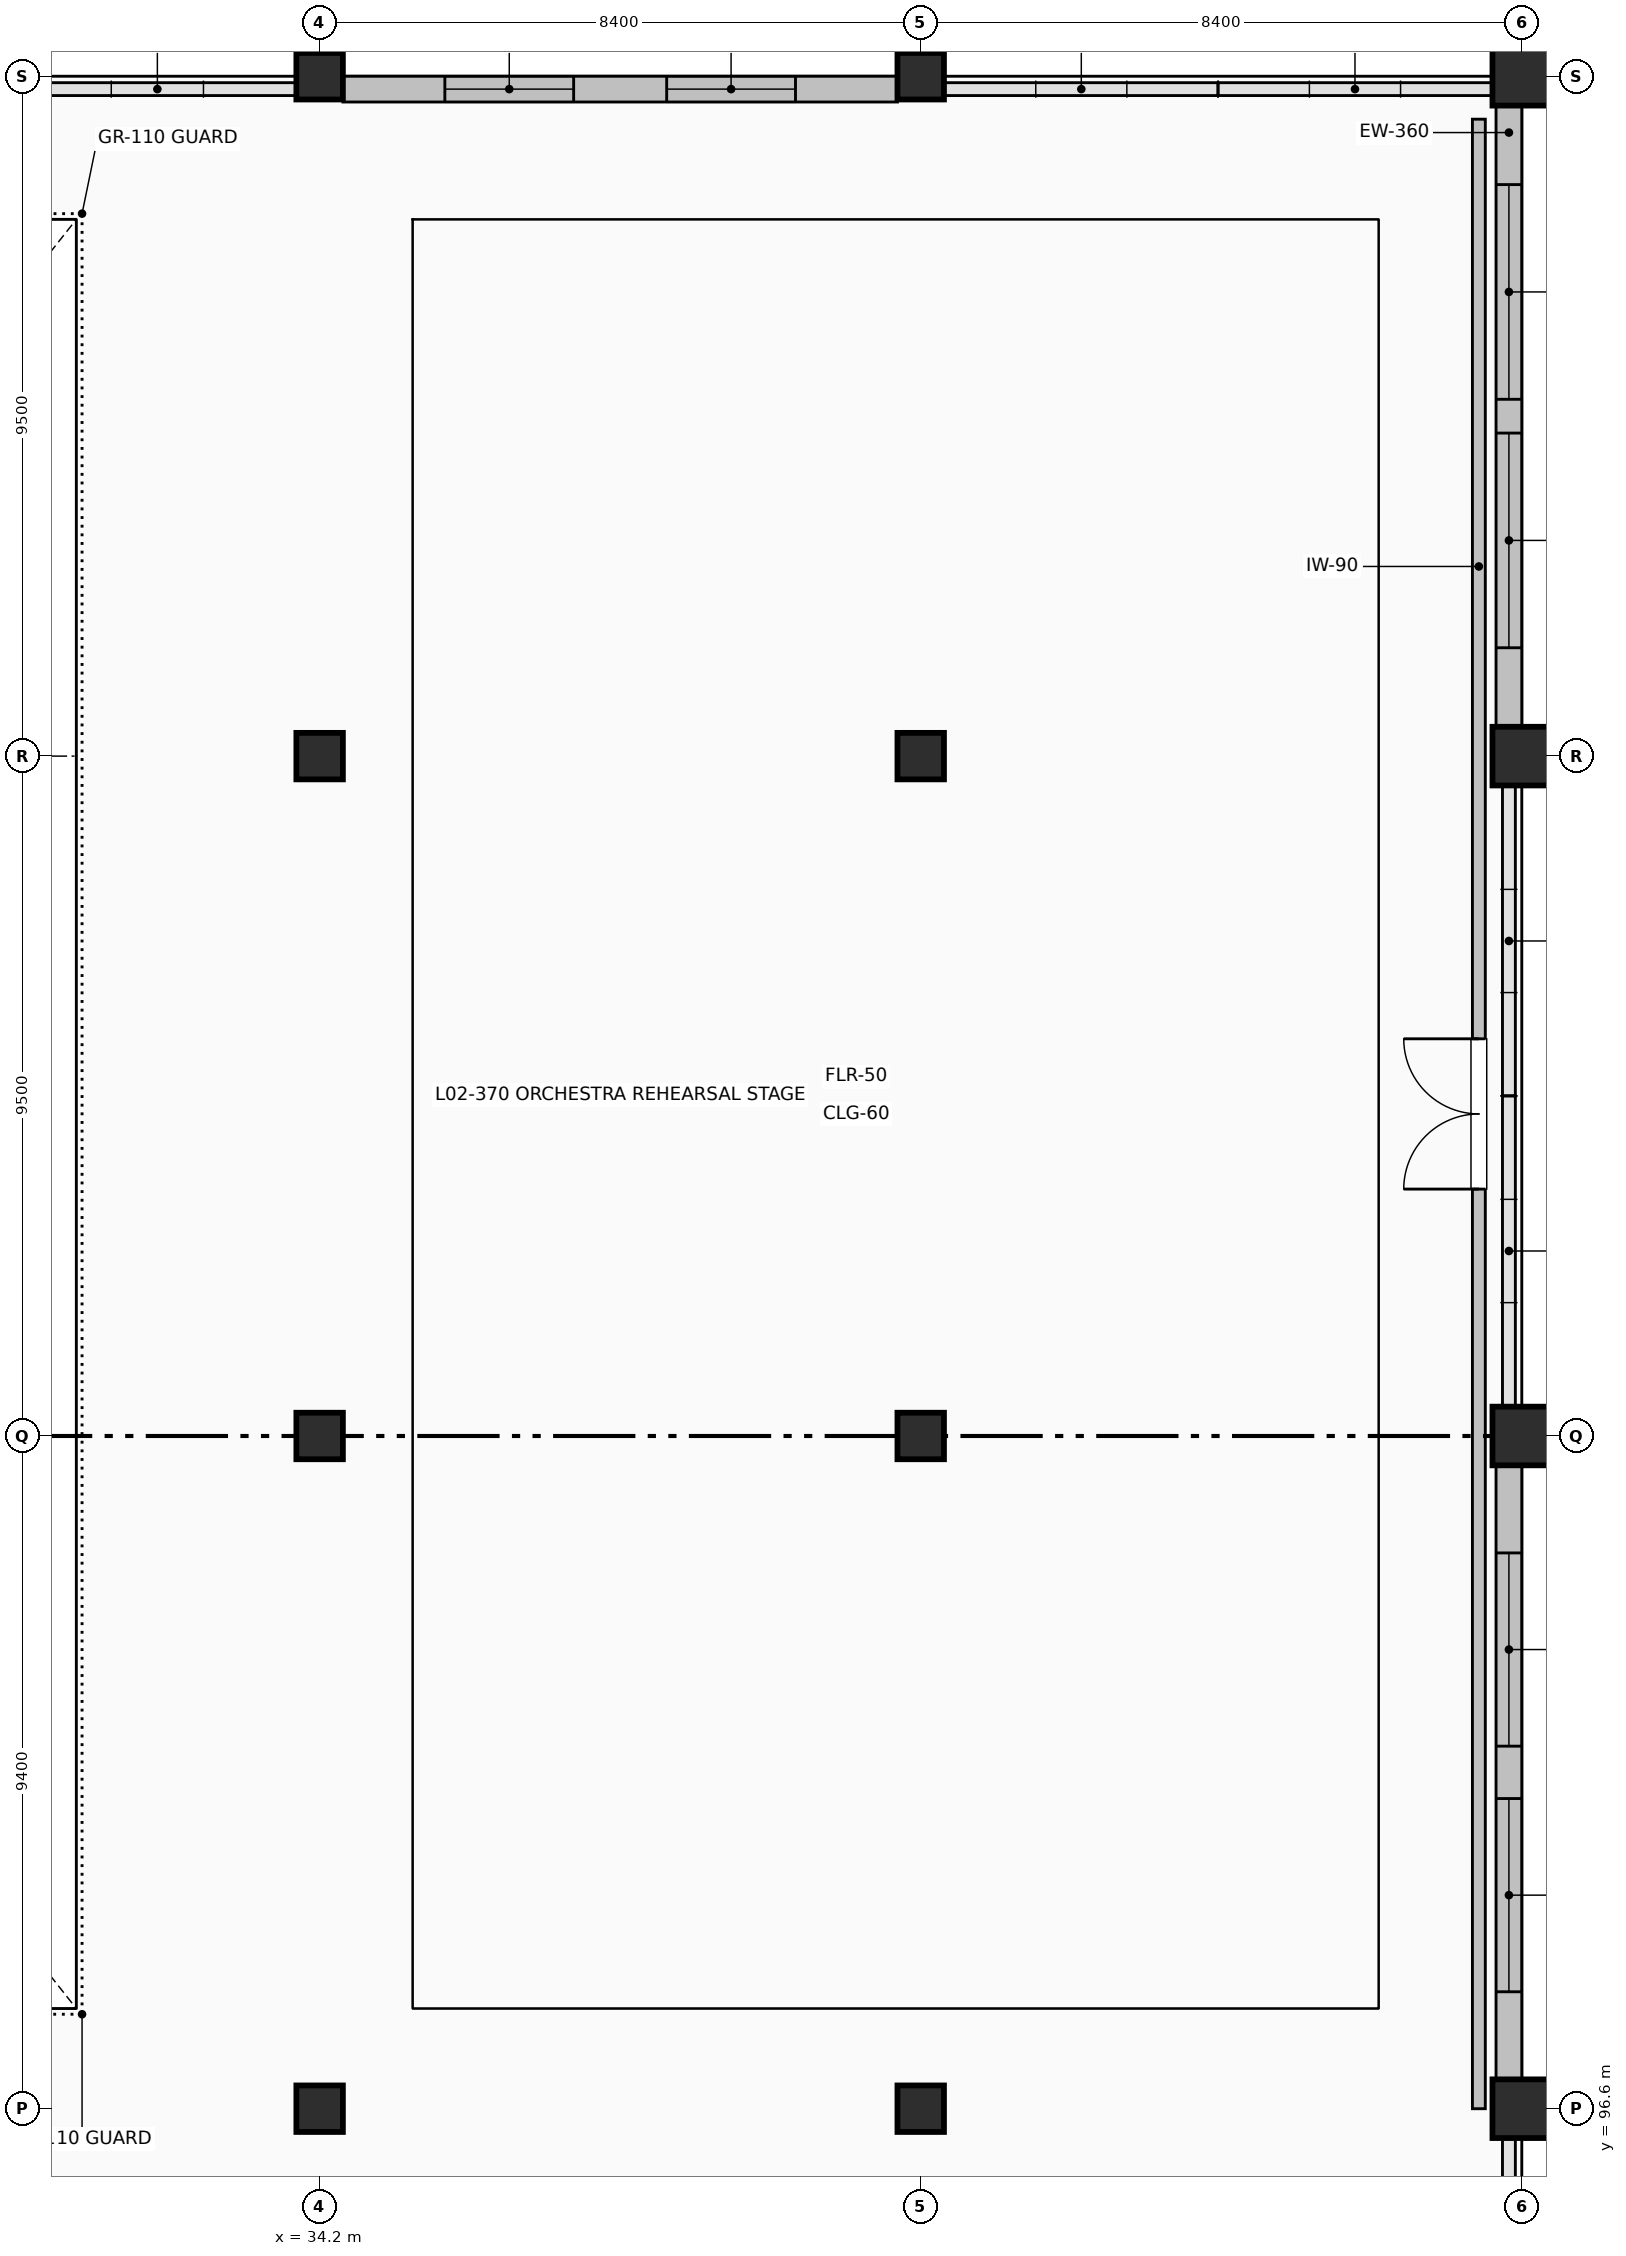
"""IFC4 building model, lengths in metres.
Left out: names, types, materials, properties, quantities, classifications, styles, units other than length and angle.
Written with IfcOpenShell. Run it as: python <this file> out.ifc"""

import sys

from ifc_helpers import new_model, si_unit, direction, frame, frame_2d, origin, origin_2d, place, context, subcontext, project, spatial, rectangle, extrude, element, fill, save


model = new_model("IFC4")
c1 = context("Model", 3, precision=1e-05, world=origin(), true_north=direction((0.0, 1.0)))
c2 = subcontext(c1, "Body", "Model", "MODEL_VIEW")
j1 = project(units=[si_unit("LENGTHUNIT", "METRE"), si_unit("PLANEANGLEUNIT", "RADIAN")], contexts=[c1])
p1 = place(None, origin())
s1 = spatial("IfcSite", under=j1, at=p1, CompositionType="ELEMENT")
p2 = place(p1, origin())
s2 = spatial("IfcBuilding", under=s1, at=p2, CompositionType="ELEMENT")
p3 = place(p2, frame((0.0, 0.0, 10.2)))
s3 = spatial("IfcBuildingStorey", under=s2, at=p3, CompositionType="ELEMENT", Elevation=10.2)
for number, where, z_axis, x_axis in (
    (1, (34.2, 96.6, 0.0), (0.0, 0.0, 1.0), (1.0, 0.0, 0.0)),
    (2, (34.2, 106.0, 0.0), (0.0, 0.0, 1.0), (1.0, 0.0, 0.0)),
    (3, (34.2, 115.5, 0.0), (0.0, 0.0, 1.0), (1.0, 0.0, 0.0)),
    (4, (34.2, 125.0, 0.0), (0.0, 0.0, 1.0), (1.0, 0.0, 0.0)),
    (5, (42.6, 96.6, 0.0), (0.0, 0.0, 1.0), (1.0, 0.0, 0.0)),
    (6, (42.6, 106.0, 0.0), (0.0, 0.0, 1.0), (1.0, 0.0, 0.0)),
    (7, (42.6, 115.5, 0.0), (0.0, 0.0, 1.0), (1.0, 0.0, 0.0)),
    (8, (42.6, 125.0, 0.0), (0.0, 0.0, 1.0), (1.0, 0.0, 0.0)),
):
    element("IfcColumn", number, at=place(p3, frame(where, z_axis=z_axis, x_axis=x_axis)), inside=s3, PredefinedType="COLUMN", context=c2, shape_type="SweptSolid", body=[
        extrude(rectangle(XDim=0.65, YDim=0.65, at=origin_2d()), origin(), (0.0, 0.0, 1.0), 4.8),
    ])
for number, where, z_axis, x_axis in (
    (9, (51.0, 96.6, 0.0), (0.0, 0.0, 1.0), (1.0, 0.0, 0.0)),
    (10, (51.0, 106.0, 0.0), (0.0, 0.0, 1.0), (1.0, 0.0, 0.0)),
    (11, (51.0, 115.5, 0.0), (0.0, 0.0, 1.0), (1.0, 0.0, 0.0)),
    (12, (51.0, 125.0, 0.0), (0.0, 0.0, 1.0), (1.0, 0.0, 0.0)),
):
    element("IfcColumn", number, at=place(p3, frame(where, z_axis=z_axis, x_axis=x_axis)), inside=s3, PredefinedType="COLUMN", context=c2, shape_type="SweptSolid", body=[
        extrude(rectangle(XDim=0.82, YDim=0.82, at=origin_2d()), origin(), (0.0, 0.0, 1.0), 4.8),
    ])
p4 = place(p3, frame((50.82, 124.59, 0.0), z_axis=(0.0, 0.0, 1.0), x_axis=(0.0, -1.0, 0.0)))
e13 = element("IfcWall", 13, at=p4, inside=s3, PredefinedType="SOLIDWALL", context=c2, shape_type="SweptSolid", body=[
    extrude(rectangle(XDim=8.68, YDim=0.36, at=frame_2d((4.34, 0.0))), origin(), (0.0, 0.0, 1.0), 3.592),
])
p5 = place(p4, frame((1.104, 0.0, 0.9)))
e14 = element("IfcOpeningElement", 14, at=p5, cuts=e13, PredefinedType="OPENING", context=c2, shape_type="SweptSolid", body=[
    extrude(rectangle(XDim=3.0, YDim=2.1, at=frame_2d((1.5, 1.05))), frame((0.0, 0.19, 0.0), z_axis=(0.0, -1.0, 0.0), x_axis=(1.0, 0.0, 0.0)), (0.0, 0.0, 1.0), 0.38),
])
p6 = place(p4, frame((4.576, 0.0, 0.9)))
e15 = element("IfcOpeningElement", 15, at=p6, cuts=e13, PredefinedType="OPENING", context=c2, shape_type="SweptSolid", body=[
    extrude(rectangle(XDim=3.0, YDim=2.1, at=frame_2d((1.5, 1.05))), frame((0.0, 0.19, 0.0), z_axis=(0.0, -1.0, 0.0), x_axis=(1.0, 0.0, 0.0)), (0.0, 0.0, 1.0), 0.38),
])
p7 = place(p3, frame((50.82, 105.59, 0.0), z_axis=(0.0, 0.0, 1.0), x_axis=(0.0, -1.0, 0.0)))
e16 = element("IfcWall", 16, at=p7, inside=s3, PredefinedType="SOLIDWALL", context=c2, shape_type="SweptSolid", body=[
    extrude(rectangle(XDim=8.58, YDim=0.36, at=frame_2d((4.29, 0.0))), origin(), (0.0, 0.0, 1.0), 3.592),
])
p8 = place(p7, frame((1.224, 0.0, 0.9)))
e17 = element("IfcOpeningElement", 17, at=p8, cuts=e16, PredefinedType="OPENING", context=c2, shape_type="SweptSolid", body=[
    extrude(rectangle(XDim=2.7, YDim=2.1, at=frame_2d((1.35, 1.05))), frame((0.0, 0.19, 0.0), z_axis=(0.0, -1.0, 0.0), x_axis=(1.0, 0.0, 0.0)), (0.0, 0.0, 1.0), 0.38),
])
p9 = place(p7, frame((4.656, 0.0, 0.9)))
e18 = element("IfcOpeningElement", 18, at=p9, cuts=e16, PredefinedType="OPENING", context=c2, shape_type="SweptSolid", body=[
    extrude(rectangle(XDim=2.7, YDim=2.1, at=frame_2d((1.35, 1.05))), frame((0.0, 0.19, 0.0), z_axis=(0.0, -1.0, 0.0), x_axis=(1.0, 0.0, 0.0)), (0.0, 0.0, 1.0), 0.38),
])
p10 = place(p3, frame((34.525, 124.82, 0.0), z_axis=(0.0, 0.0, 1.0), x_axis=(1.0, 0.0, 0.0)))
e19 = element("IfcWall", 19, at=p10, inside=s3, PredefinedType="SOLIDWALL", context=c2, shape_type="SweptSolid", body=[
    extrude(rectangle(XDim=7.75, YDim=0.36, at=frame_2d((3.875, 0.0))), origin(), (0.0, 0.0, 1.0), 3.592),
])
p11 = place(p10, frame((1.425, 0.0, 0.9)))
e20 = element("IfcOpeningElement", 20, at=p11, cuts=e19, PredefinedType="OPENING", context=c2, shape_type="SweptSolid", body=[
    extrude(rectangle(XDim=1.8, YDim=2.1, at=frame_2d((0.9, 1.05))), frame((0.0, 0.19, 0.0), z_axis=(0.0, -1.0, 0.0), x_axis=(1.0, 0.0, 0.0)), (0.0, 0.0, 1.0), 0.38),
])
p12 = place(p10, frame((4.525, 0.0, 0.9)))
e21 = element("IfcOpeningElement", 21, at=p12, cuts=e19, PredefinedType="OPENING", context=c2, shape_type="SweptSolid", body=[
    extrude(rectangle(XDim=1.8, YDim=2.1, at=frame_2d((0.9, 1.05))), frame((0.0, 0.19, 0.0), z_axis=(0.0, -1.0, 0.0), x_axis=(1.0, 0.0, 0.0)), (0.0, 0.0, 1.0), 0.38),
])
p13 = place(p3, frame((50.4, 96.6, 0.0), z_axis=(0.0, 0.0, 1.0), x_axis=(0.0, 1.0, 0.0)))
e22 = element("IfcWall", 22, at=p13, inside=s3, PredefinedType="PARTITIONING", context=c2, shape_type="SweptSolid", body=[
    extrude(rectangle(XDim=27.8, YDim=0.18, at=frame_2d((13.9, 0.0))), origin(), (0.0, 0.0, 1.0), 4.492),
])
p14 = place(p13, frame((12.85, 0.0, 0.0)))
e23 = element("IfcOpeningElement", 23, at=p14, cuts=e22, PredefinedType="OPENING", context=c2, shape_type="SweptSolid", body=[
    extrude(rectangle(XDim=2.1, YDim=2.25, at=frame_2d((1.05, 1.125))), frame((0.0, 0.1, 0.0), z_axis=(0.0, -1.0, 0.0), x_axis=(1.0, 0.0, 0.0)), (0.0, 0.0, 1.0), 0.2),
])
p15 = place(p5, origin())
e24 = element("IfcWindow", 24, at=p15, inside=s3, PartitioningType="SINGLE_PANEL", PredefinedType="WINDOW", context=c2, shape_type="SweptSolid", body=[
    extrude(rectangle(XDim=3.0, YDim=2.1, at=frame_2d((1.5, 1.05))), frame((0.0, 0.03, 0.0), z_axis=(0.0, -1.0, 0.0), x_axis=(1.0, 0.0, 0.0)), (0.0, 0.0, 1.0), 0.06),
])
fill(e14, e24)
p16 = place(p6, origin())
e25 = element("IfcWindow", 25, at=p16, inside=s3, PartitioningType="SINGLE_PANEL", PredefinedType="WINDOW", context=c2, shape_type="SweptSolid", body=[
    extrude(rectangle(XDim=3.0, YDim=2.1, at=frame_2d((1.5, 1.05))), frame((0.0, 0.03, 0.0), z_axis=(0.0, -1.0, 0.0), x_axis=(1.0, 0.0, 0.0)), (0.0, 0.0, 1.0), 0.06),
])
fill(e15, e25)
p17 = place(p8, origin())
e26 = element("IfcWindow", 26, at=p17, inside=s3, PartitioningType="SINGLE_PANEL", PredefinedType="WINDOW", context=c2, shape_type="SweptSolid", body=[
    extrude(rectangle(XDim=2.7, YDim=2.1, at=frame_2d((1.35, 1.05))), frame((0.0, 0.03, 0.0), z_axis=(0.0, -1.0, 0.0), x_axis=(1.0, 0.0, 0.0)), (0.0, 0.0, 1.0), 0.06),
])
fill(e17, e26)
p18 = place(p9, origin())
e27 = element("IfcWindow", 27, at=p18, inside=s3, PartitioningType="SINGLE_PANEL", PredefinedType="WINDOW", context=c2, shape_type="SweptSolid", body=[
    extrude(rectangle(XDim=2.7, YDim=2.1, at=frame_2d((1.35, 1.05))), frame((0.0, 0.03, 0.0), z_axis=(0.0, -1.0, 0.0), x_axis=(1.0, 0.0, 0.0)), (0.0, 0.0, 1.0), 0.06),
])
fill(e18, e27)
p19 = place(p11, origin())
e28 = element("IfcWindow", 28, at=p19, inside=s3, PartitioningType="SINGLE_PANEL", PredefinedType="WINDOW", context=c2, shape_type="SweptSolid", body=[
    extrude(rectangle(XDim=1.8, YDim=2.1, at=frame_2d((0.9, 1.05))), frame((0.0, 0.03, 0.0), z_axis=(0.0, -1.0, 0.0), x_axis=(1.0, 0.0, 0.0)), (0.0, 0.0, 1.0), 0.06),
])
fill(e20, e28)
p20 = place(p12, origin())
e29 = element("IfcWindow", 29, at=p20, inside=s3, PartitioningType="SINGLE_PANEL", PredefinedType="WINDOW", context=c2, shape_type="SweptSolid", body=[
    extrude(rectangle(XDim=1.8, YDim=2.1, at=frame_2d((0.9, 1.05))), frame((0.0, 0.03, 0.0), z_axis=(0.0, -1.0, 0.0), x_axis=(1.0, 0.0, 0.0)), (0.0, 0.0, 1.0), 0.06),
])
fill(e21, e29)
p21 = place(p14, origin())
e30 = element("IfcDoor", 30, at=p21, inside=s3, OperationType="DOUBLE_DOOR_SINGLE_SWING", PredefinedType="DOOR", context=c2, shape_type="SweptSolid", body=[
    extrude(rectangle(XDim=2.1, YDim=2.25, at=frame_2d((1.05, 1.125))), frame((0.0, 0.025, 0.0), z_axis=(0.0, -1.0, 0.0), x_axis=(1.0, 0.0, 0.0)), (0.0, 0.0, 1.0), 0.05),
])
fill(e23, e30)
save(model, sys.argv[1])
